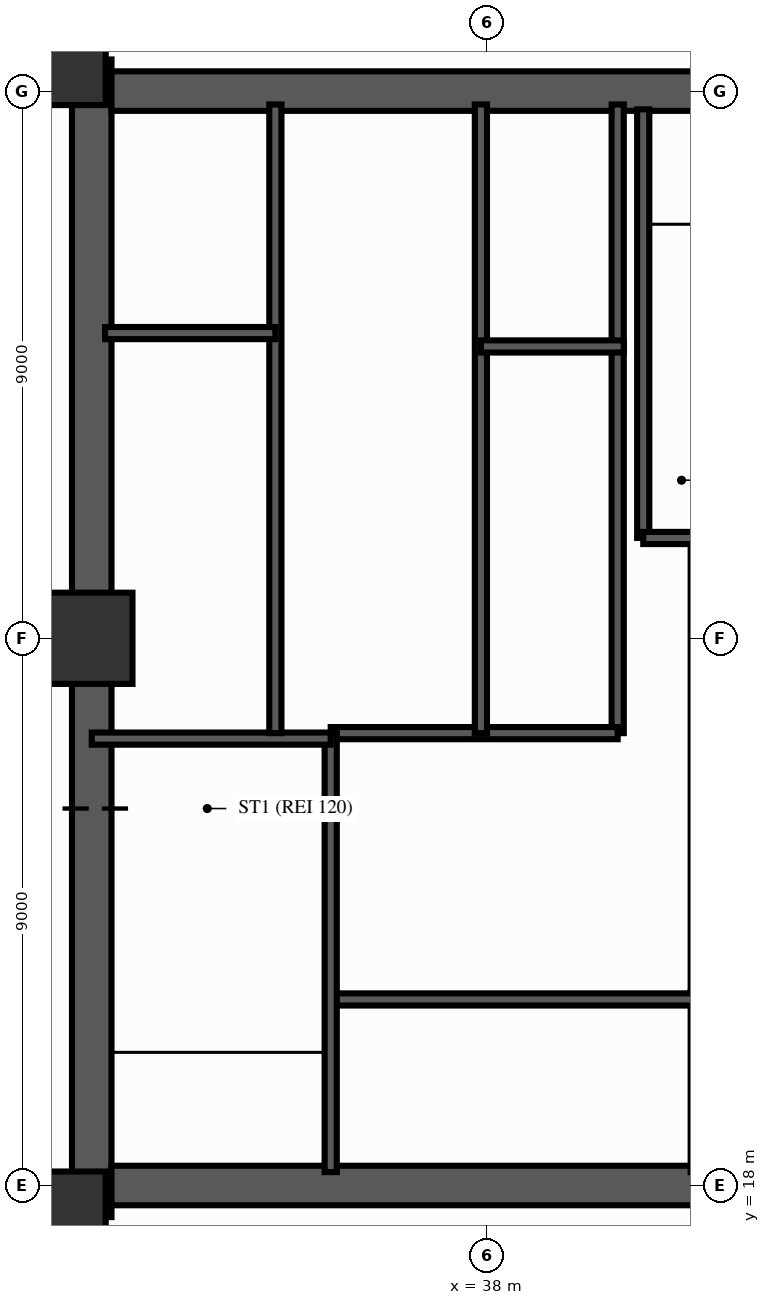
"""IFC4 building model, lengths in metres.
Left out: names, types, materials, properties, quantities, classifications, styles, units other than length and angle.
Written with IfcOpenShell. Run it as: python <this file> out.ifc"""

import sys

from ifc_helpers import new_model, si_unit, direction, frame, frame_2d, origin, origin_2d, place, context, subcontext, project, spatial, rectangle, extrude, source, transform, mapped, element, fill, save


model = new_model("IFC4")
c1 = context("Model", 3, precision=1e-05, world=origin(), true_north=direction((0.0, 1.0)))
c2 = subcontext(c1, "Body", "Model", "MODEL_VIEW")
j1 = project(units=[si_unit("LENGTHUNIT", "METRE"), si_unit("PLANEANGLEUNIT", "RADIAN")], contexts=[c1])
p1 = place(None, origin())
s1 = spatial("IfcSite", under=j1, at=p1, CompositionType="ELEMENT")
p2 = place(p1, origin())
s2 = spatial("IfcBuilding", under=s1, at=p2, CompositionType="ELEMENT")
p3 = place(p2, frame((0.0, 0.0, -9.2)))
s3 = spatial("IfcBuildingStorey", under=s2, at=p3, CompositionType="ELEMENT", Elevation=-9.2)
p4 = place(p3, frame((31.5, 17.48, 0.0), z_axis=(0.0, 0.0, 1.0), x_axis=(0.0, 1.0, 0.0)))
e1 = element("IfcWall", 1, at=p4, inside=s3, PredefinedType="SHEAR", context=c2, shape_type="SweptSolid", body=[
    extrude(rectangle(XDim=19.04, YDim=0.65, at=frame_2d((9.52, 0.0))), origin(), (0.0, 0.0, 1.0), 4.6),
])
p5 = place(p4, frame((6.32, 0.0, 0.0)))
e2 = element("IfcOpeningElement", 2, at=p5, cuts=e1, PredefinedType="OPENING", context=c2, shape_type="SweptSolid", body=[
    extrude(rectangle(XDim=1.1, YDim=2.15, at=frame_2d((0.55, 1.075))), frame((0.0, 0.337, 0.0), z_axis=(0.0, -1.0, 0.0), x_axis=(1.0, 0.0, 0.0)), (0.0, 0.0, 1.0), 0.674),
])
p6 = place(p3, frame((31.825, 18.0, 0.0), z_axis=(0.0, 0.0, 1.0), x_axis=(1.0, 0.0, 0.0)))
e3 = element("IfcWall", 3, at=p6, inside=s3, PredefinedType="SHEAR", context=c2, shape_type="SweptSolid", body=[
    extrude(rectangle(XDim=12.35, YDim=0.65, at=frame_2d((6.175, 0.0))), origin(), (0.0, 0.0, 1.0), 4.6),
])
p7 = place(p3, frame((31.825, 36.0, 0.0), z_axis=(0.0, 0.0, 1.0), x_axis=(1.0, 0.0, 0.0)))
e4 = element("IfcWall", 4, at=p7, inside=s3, PredefinedType="SHEAR", context=c2, shape_type="SweptSolid", body=[
    extrude(rectangle(XDim=12.35, YDim=0.65, at=frame_2d((6.175, 0.0))), origin(), (0.0, 0.0, 1.0), 4.6),
])
p8 = place(p7, frame((5.125, 0.0, 0.0), z_axis=(0.0, 0.0, 1.0), x_axis=(-1.0, 0.0, 0.0)))
e5 = element("IfcOpeningElement", 5, at=p8, cuts=e4, PredefinedType="OPENING", context=c2, shape_type="SweptSolid", body=[
    extrude(rectangle(XDim=1.4, YDim=2.15, at=frame_2d((0.7, 1.075))), frame((0.0, 0.337, 0.0), z_axis=(0.0, -1.0, 0.0), x_axis=(1.0, 0.0, 0.0)), (0.0, 0.0, 1.0), 0.674),
])
m1 = source(origin(), c2, "Body", "SweptSolid", [
    extrude(rectangle(XDim=1.5, YDim=1.5, at=origin_2d()), origin(), (0.0, 0.0, 1.0), 4.6),
])
for number, where, z_axis, x_axis in (
    (6, (30.98, 17.48, 0.0), (0.0, 0.0, 1.0), (1.0, 0.0, 0.0)),
    (7, (30.98, 36.52, 0.0), (0.0, 0.0, 1.0), (1.0, 0.0, 0.0)),
    (8, (31.42, 27.0, 0.0), (0.0, 0.0, 1.0), (1.0, 0.0, 0.0)),
):
    element("IfcColumn", number, at=place(p3, frame(where, z_axis=z_axis, x_axis=x_axis)), inside=s3, PredefinedType="COLUMN", context=c2, shape_type="MappedRepresentation", body=[
        mapped(m1, transform((0.0, 0.0, 0.0), scale=1.0)),
    ])
p9 = place(p3, frame((41.45, 18.22, 0.0), z_axis=(0.0, 0.0, 1.0), x_axis=(0.0, 1.0, 0.0)))
e9 = element("IfcWall", 9, at=p9, inside=s3, PredefinedType="PARTITIONING", context=c2, shape_type="SweptSolid", body=[
    extrude(rectangle(XDim=2.96, YDim=0.2, at=frame_2d((1.48, 0.0))), origin(), (0.0, 0.0, 1.0), 4.3),
])
p10 = place(p3, frame((41.45, 21.18, 0.0), z_axis=(0.0, 0.0, 1.0), x_axis=(0.0, 1.0, 0.0)))
e10 = element("IfcWall", 10, at=p10, inside=s3, PredefinedType="PARTITIONING", context=c2, shape_type="SweptSolid", body=[
    extrude(rectangle(XDim=7.42, YDim=0.2, at=frame_2d((3.71, 0.0))), origin(), (0.0, 0.0, 1.0), 4.3),
])
p11 = place(p10, frame((2.6, 0.0, 0.0)))
e11 = element("IfcOpeningElement", 11, at=p11, cuts=e10, PredefinedType="OPENING", context=c2, shape_type="SweptSolid", body=[
    extrude(rectangle(XDim=0.9, YDim=2.1, at=frame_2d((0.45, 1.05))), frame((0.0, 0.112, 0.0), z_axis=(0.0, -1.0, 0.0), x_axis=(1.0, 0.0, 0.0)), (0.0, 0.0, 1.0), 0.224),
])
p12 = place(p3, frame((40.15, 25.44, 0.0), z_axis=(0.0, 0.0, 1.0), x_axis=(0.0, 1.0, 0.0)))
e12 = element("IfcWall", 12, at=p12, inside=s3, PredefinedType="PARTITIONING", context=c2, shape_type="SweptSolid", body=[
    extrude(rectangle(XDim=6.36, YDim=0.2, at=frame_2d((3.18, 0.0))), origin(), (0.0, 0.0, 1.0), 4.3),
])
p13 = place(p3, frame((40.15, 31.8, 0.0), z_axis=(0.0, 0.0, 1.0), x_axis=(0.0, 1.0, 0.0)))
e13 = element("IfcWall", 13, at=p13, inside=s3, PredefinedType="PARTITIONING", context=c2, shape_type="SweptSolid", body=[
    extrude(rectangle(XDim=3.98, YDim=0.2, at=frame_2d((1.99, 0.0))), origin(), (0.0, 0.0, 1.0), 4.3),
])
p14 = place(p3, frame((35.43, 21.06, 0.0), z_axis=(0.0, 0.0, 1.0), x_axis=(1.0, 0.0, 0.0)))
e14 = element("IfcWall", 14, at=p14, inside=s3, PredefinedType="PARTITIONING", context=c2, shape_type="SweptSolid", body=[
    extrude(rectangle(XDim=6.02, YDim=0.2, at=frame_2d((3.01, 0.0))), origin(), (0.0, 0.0, 1.0), 4.3),
])
p15 = place(p14, frame((1.0, 0.0, 0.0)))
e15 = element("IfcOpeningElement", 15, at=p15, cuts=e14, PredefinedType="OPENING", context=c2, shape_type="SweptSolid", body=[
    extrude(rectangle(XDim=1.1, YDim=2.15, at=frame_2d((0.55, 1.075))), frame((0.0, 0.112, 0.0), z_axis=(0.0, -1.0, 0.0), x_axis=(1.0, 0.0, 0.0)), (0.0, 0.0, 1.0), 0.224),
])
p16 = place(p14, frame((2.95, 0.0, 0.0)))
e16 = element("IfcOpeningElement", 16, at=p16, cuts=e14, PredefinedType="OPENING", context=c2, shape_type="SweptSolid", body=[
    extrude(rectangle(XDim=1.1, YDim=2.15, at=frame_2d((0.55, 1.075))), frame((0.0, 0.112, 0.0), z_axis=(0.0, -1.0, 0.0), x_axis=(1.0, 0.0, 0.0)), (0.0, 0.0, 1.0), 0.224),
])
p17 = place(p14, frame((4.58, 0.0, 0.0)))
e17 = element("IfcOpeningElement", 17, at=p17, cuts=e14, PredefinedType="OPENING", context=c2, shape_type="SweptSolid", body=[
    extrude(rectangle(XDim=1.2, YDim=2.15, at=frame_2d((0.6, 1.075))), frame((0.0, 0.112, 0.0), z_axis=(0.0, -1.0, 0.0), x_axis=(1.0, 0.0, 0.0)), (0.0, 0.0, 1.0), 0.224),
])
p18 = place(p3, frame((35.43, 25.44, 0.0), z_axis=(0.0, 0.0, 1.0), x_axis=(1.0, 0.0, 0.0)))
e18 = element("IfcWall", 18, at=p18, inside=s3, PredefinedType="PARTITIONING", context=c2, shape_type="SweptSolid", body=[
    extrude(rectangle(XDim=4.72, YDim=0.2, at=frame_2d((2.36, 0.0))), origin(), (0.0, 0.0, 1.0), 4.3),
])
p19 = place(p18, frame((1.25, 0.0, 0.0)))
e19 = element("IfcOpeningElement", 19, at=p19, cuts=e18, PredefinedType="OPENING", context=c2, shape_type="SweptSolid", body=[
    extrude(rectangle(XDim=1.1, YDim=2.15, at=frame_2d((0.55, 1.075))), frame((0.0, 0.112, 0.0), z_axis=(0.0, -1.0, 0.0), x_axis=(1.0, 0.0, 0.0)), (0.0, 0.0, 1.0), 0.224),
])
p20 = place(p3, frame((35.43, 18.22, 0.0), z_axis=(0.0, 0.0, 1.0), x_axis=(0.0, 1.0, 0.0)))
e20 = element("IfcWall", 20, at=p20, inside=s3, PredefinedType="SOLIDWALL", context=c2, shape_type="SweptSolid", body=[
    extrude(rectangle(XDim=7.22, YDim=0.2, at=frame_2d((3.61, 0.0))), origin(), (0.0, 0.0, 1.0), 4.3),
])
p21 = place(p20, frame((6.68, 0.0, 0.0), z_axis=(0.0, 0.0, 1.0), x_axis=(-1.0, 0.0, 0.0)))
e21 = element("IfcOpeningElement", 21, at=p21, cuts=e20, PredefinedType="OPENING", context=c2, shape_type="SweptSolid", body=[
    extrude(rectangle(XDim=1.1, YDim=2.15, at=frame_2d((0.55, 1.075))), frame((0.0, 0.112, 0.0), z_axis=(0.0, -1.0, 0.0), x_axis=(1.0, 0.0, 0.0)), (0.0, 0.0, 1.0), 0.224),
])
p22 = place(p3, frame((31.5, 25.35, 0.0), z_axis=(0.0, 0.0, 1.0), x_axis=(1.0, 0.0, 0.0)))
e22 = element("IfcWall", 22, at=p22, inside=s3, PredefinedType="SOLIDWALL", context=c2, shape_type="SweptSolid", body=[
    extrude(rectangle(XDim=3.93, YDim=0.2, at=frame_2d((1.965, 0.0))), origin(), (0.0, 0.0, 1.0), 4.3),
])
p23 = place(p3, frame((40.57, 28.65, 0.0), z_axis=(0.0, 0.0, 1.0), x_axis=(0.0, 1.0, 0.0)))
e23 = element("IfcWall", 23, at=p23, inside=s3, PredefinedType="SOLIDWALL", context=c2, shape_type="SweptSolid", body=[
    extrude(rectangle(XDim=7.05, YDim=0.2, at=frame_2d((3.525, 0.0))), origin(), (0.0, 0.0, 1.0), 4.3),
])
p24 = place(p3, frame((40.57, 28.65, 0.0), z_axis=(0.0, 0.0, 1.0), x_axis=(1.0, 0.0, 0.0)))
e24 = element("IfcWall", 24, at=p24, inside=s3, PredefinedType="SOLIDWALL", context=c2, shape_type="SweptSolid", body=[
    extrude(rectangle(XDim=3.93, YDim=0.2, at=frame_2d((1.965, 0.0))), origin(), (0.0, 0.0, 1.0), 4.3),
])
p25 = place(p3, frame((34.52, 25.44, 0.0), z_axis=(0.0, 0.0, 1.0), x_axis=(0.0, 1.0, 0.0)))
e25 = element("IfcWall", 25, at=p25, inside=s3, PredefinedType="PARTITIONING", context=c2, shape_type="SweptSolid", body=[
    extrude(rectangle(XDim=10.34, YDim=0.2, at=frame_2d((5.17, 0.0))), origin(), (0.0, 0.0, 1.0), 4.3),
])
p26 = place(p25, frame((0.32, 0.0, 0.0)))
e26 = element("IfcOpeningElement", 26, at=p26, cuts=e25, PredefinedType="OPENING", context=c2, shape_type="SweptSolid", body=[
    extrude(rectangle(XDim=1.0, YDim=2.15, at=frame_2d((0.5, 1.075))), frame((0.0, 0.112, 0.0), z_axis=(0.0, -1.0, 0.0), x_axis=(1.0, 0.0, 0.0)), (0.0, 0.0, 1.0), 0.224),
])
p27 = place(p25, frame((1.71, 0.0, 0.0)))
e27 = element("IfcOpeningElement", 27, at=p27, cuts=e25, PredefinedType="OPENING", context=c2, shape_type="SweptSolid", body=[
    extrude(rectangle(XDim=1.0, YDim=2.15, at=frame_2d((0.5, 1.075))), frame((0.0, 0.112, 0.0), z_axis=(0.0, -1.0, 0.0), x_axis=(1.0, 0.0, 0.0)), (0.0, 0.0, 1.0), 0.224),
])
p28 = place(p25, frame((3.535, 0.0, 0.0)))
e28 = element("IfcOpeningElement", 28, at=p28, cuts=e25, PredefinedType="OPENING", context=c2, shape_type="SweptSolid", body=[
    extrude(rectangle(XDim=1.0, YDim=2.15, at=frame_2d((0.5, 1.075))), frame((0.0, 0.112, 0.0), z_axis=(0.0, -1.0, 0.0), x_axis=(1.0, 0.0, 0.0)), (0.0, 0.0, 1.0), 0.224),
])
p29 = place(p25, frame((5.135, 0.0, 0.0)))
e29 = element("IfcOpeningElement", 29, at=p29, cuts=e25, PredefinedType="OPENING", context=c2, shape_type="SweptSolid", body=[
    extrude(rectangle(XDim=1.0, YDim=2.15, at=frame_2d((0.5, 1.075))), frame((0.0, 0.112, 0.0), z_axis=(0.0, -1.0, 0.0), x_axis=(1.0, 0.0, 0.0)), (0.0, 0.0, 1.0), 0.224),
])
p30 = place(p25, frame((7.01, 0.0, 0.0)))
e30 = element("IfcOpeningElement", 30, at=p30, cuts=e25, PredefinedType="OPENING", context=c2, shape_type="SweptSolid", body=[
    extrude(rectangle(XDim=1.0, YDim=2.15, at=frame_2d((0.5, 1.075))), frame((0.0, 0.112, 0.0), z_axis=(0.0, -1.0, 0.0), x_axis=(1.0, 0.0, 0.0)), (0.0, 0.0, 1.0), 0.224),
])
p31 = place(p25, frame((8.76, 0.0, 0.0)))
e31 = element("IfcOpeningElement", 31, at=p31, cuts=e25, PredefinedType="OPENING", context=c2, shape_type="SweptSolid", body=[
    extrude(rectangle(XDim=1.0, YDim=2.15, at=frame_2d((0.5, 1.075))), frame((0.0, 0.112, 0.0), z_axis=(0.0, -1.0, 0.0), x_axis=(1.0, 0.0, 0.0)), (0.0, 0.0, 1.0), 0.224),
])
p32 = place(p3, frame((31.72, 32.02, 0.0), z_axis=(0.0, 0.0, 1.0), x_axis=(1.0, 0.0, 0.0)))
e32 = element("IfcWall", 32, at=p32, inside=s3, PredefinedType="PARTITIONING", context=c2, shape_type="SweptSolid", body=[
    extrude(rectangle(XDim=2.8, YDim=0.2, at=frame_2d((1.4, 0.0))), origin(), (0.0, 0.0, 1.0), 4.3),
])
p33 = place(p3, frame((37.9, 25.44, 0.0), z_axis=(0.0, 0.0, 1.0), x_axis=(0.0, 1.0, 0.0)))
e33 = element("IfcWall", 33, at=p33, inside=s3, PredefinedType="PARTITIONING", context=c2, shape_type="SweptSolid", body=[
    extrude(rectangle(XDim=10.34, YDim=0.2, at=frame_2d((5.17, 0.0))), origin(), (0.0, 0.0, 1.0), 4.3),
])
p34 = place(p33, frame((0.32, 0.0, 0.0)))
e34 = element("IfcOpeningElement", 34, at=p34, cuts=e33, PredefinedType="OPENING", context=c2, shape_type="SweptSolid", body=[
    extrude(rectangle(XDim=1.0, YDim=2.15, at=frame_2d((0.5, 1.075))), frame((0.0, 0.112, 0.0), z_axis=(0.0, -1.0, 0.0), x_axis=(1.0, 0.0, 0.0)), (0.0, 0.0, 1.0), 0.224),
])
p35 = place(p33, frame((1.71, 0.0, 0.0)))
e35 = element("IfcOpeningElement", 35, at=p35, cuts=e33, PredefinedType="OPENING", context=c2, shape_type="SweptSolid", body=[
    extrude(rectangle(XDim=1.0, YDim=2.15, at=frame_2d((0.5, 1.075))), frame((0.0, 0.112, 0.0), z_axis=(0.0, -1.0, 0.0), x_axis=(1.0, 0.0, 0.0)), (0.0, 0.0, 1.0), 0.224),
])
p36 = place(p33, frame((3.51, 0.0, 0.0)))
e36 = element("IfcOpeningElement", 36, at=p36, cuts=e33, PredefinedType="OPENING", context=c2, shape_type="SweptSolid", body=[
    extrude(rectangle(XDim=1.0, YDim=2.15, at=frame_2d((0.5, 1.075))), frame((0.0, 0.112, 0.0), z_axis=(0.0, -1.0, 0.0), x_axis=(1.0, 0.0, 0.0)), (0.0, 0.0, 1.0), 0.224),
])
p37 = place(p33, frame((5.01, 0.0, 0.0)))
e37 = element("IfcOpeningElement", 37, at=p37, cuts=e33, PredefinedType="OPENING", context=c2, shape_type="SweptSolid", body=[
    extrude(rectangle(XDim=1.0, YDim=2.15, at=frame_2d((0.5, 1.075))), frame((0.0, 0.112, 0.0), z_axis=(0.0, -1.0, 0.0), x_axis=(1.0, 0.0, 0.0)), (0.0, 0.0, 1.0), 0.224),
])
p38 = place(p33, frame((6.86, 0.0, 0.0)))
e38 = element("IfcOpeningElement", 38, at=p38, cuts=e33, PredefinedType="OPENING", context=c2, shape_type="SweptSolid", body=[
    extrude(rectangle(XDim=1.0, YDim=2.15, at=frame_2d((0.5, 1.075))), frame((0.0, 0.112, 0.0), z_axis=(0.0, -1.0, 0.0), x_axis=(1.0, 0.0, 0.0)), (0.0, 0.0, 1.0), 0.224),
])
p39 = place(p33, frame((8.71, 0.0, 0.0)))
e39 = element("IfcOpeningElement", 39, at=p39, cuts=e33, PredefinedType="OPENING", context=c2, shape_type="SweptSolid", body=[
    extrude(rectangle(XDim=1.0, YDim=2.15, at=frame_2d((0.5, 1.075))), frame((0.0, 0.112, 0.0), z_axis=(0.0, -1.0, 0.0), x_axis=(1.0, 0.0, 0.0)), (0.0, 0.0, 1.0), 0.224),
])
p40 = place(p3, frame((37.9, 31.8, 0.0), z_axis=(0.0, 0.0, 1.0), x_axis=(1.0, 0.0, 0.0)))
e40 = element("IfcWall", 40, at=p40, inside=s3, PredefinedType="PARTITIONING", context=c2, shape_type="SweptSolid", body=[
    extrude(rectangle(XDim=2.35, YDim=0.2, at=frame_2d((1.175, 0.0))), origin(), (0.0, 0.0, 1.0), 4.3),
])
m2 = source(origin(), c2, "Body", "SweptSolid", [
    extrude(rectangle(XDim=1.1, YDim=2.15, at=frame_2d((0.55, 1.075))), frame((0.0, 0.025, 0.0), z_axis=(0.0, -1.0, 0.0), x_axis=(1.0, 0.0, 0.0)), (0.0, 0.0, 1.0), 0.05),
])
p41 = place(p5, origin())
e41 = element("IfcDoor", 41, at=p41, inside=s3, OperationType="SINGLE_SWING_LEFT", PredefinedType="DOOR", context=c2, shape_type="MappedRepresentation", body=[
    mapped(m2, transform((0.0, 0.0, 0.0), scale=1.0)),
])
fill(e2, e41)
m3 = source(origin(), c2, "Body", "SweptSolid", [
    extrude(rectangle(XDim=1.4, YDim=2.15, at=frame_2d((0.7, 1.075))), frame((0.0, 0.025, 0.0), z_axis=(0.0, -1.0, 0.0), x_axis=(1.0, 0.0, 0.0)), (0.0, 0.0, 1.0), 0.05),
])
p42 = place(p8, origin())
e42 = element("IfcDoor", 42, at=p42, inside=s3, OperationType="SINGLE_SWING_RIGHT", PredefinedType="DOOR", context=c2, shape_type="MappedRepresentation", body=[
    mapped(m3, transform((0.0, 0.0, 0.0), scale=1.0)),
])
fill(e5, e42)
p43 = place(p15, origin())
e43 = element("IfcDoor", 43, at=p43, inside=s3, OperationType="DOUBLE_DOOR_SLIDING", PredefinedType="DOOR", context=c2, shape_type="MappedRepresentation", body=[
    mapped(m2, transform((0.0, 0.0, 0.0), scale=1.0)),
])
fill(e15, e43)
p44 = place(p16, origin())
e44 = element("IfcDoor", 44, at=p44, inside=s3, OperationType="DOUBLE_DOOR_SLIDING", PredefinedType="DOOR", context=c2, shape_type="MappedRepresentation", body=[
    mapped(m2, transform((0.0, 0.0, 0.0), scale=1.0)),
])
fill(e16, e44)
m4 = source(origin(), c2, "Body", "SweptSolid", [
    extrude(rectangle(XDim=1.2, YDim=2.15, at=frame_2d((0.6, 1.075))), frame((0.0, 0.025, 0.0), z_axis=(0.0, -1.0, 0.0), x_axis=(1.0, 0.0, 0.0)), (0.0, 0.0, 1.0), 0.05),
])
p45 = place(p17, origin())
e45 = element("IfcDoor", 45, at=p45, inside=s3, OperationType="DOUBLE_DOOR_SLIDING", PredefinedType="DOOR", context=c2, shape_type="MappedRepresentation", body=[
    mapped(m4, transform((0.0, 0.0, 0.0), scale=1.0)),
])
fill(e17, e45)
p46 = place(p19, origin())
e46 = element("IfcDoor", 46, at=p46, inside=s3, OperationType="SINGLE_SWING_RIGHT", PredefinedType="DOOR", context=c2, shape_type="MappedRepresentation", body=[
    mapped(m2, transform((0.0, 0.0, 0.0), scale=1.0)),
])
fill(e19, e46)
p47 = place(p21, origin())
e47 = element("IfcDoor", 47, at=p47, inside=s3, OperationType="SINGLE_SWING_LEFT", PredefinedType="DOOR", context=c2, shape_type="MappedRepresentation", body=[
    mapped(m2, transform((0.0, 0.0, 0.0), scale=1.0)),
])
fill(e21, e47)
m5 = source(origin(), c2, "Body", "SweptSolid", [
    extrude(rectangle(XDim=1.0, YDim=2.15, at=frame_2d((0.5, 1.075))), frame((0.0, 0.025, 0.0), z_axis=(0.0, -1.0, 0.0), x_axis=(1.0, 0.0, 0.0)), (0.0, 0.0, 1.0), 0.05),
])
p48 = place(p26, origin())
e48 = element("IfcDoor", 48, at=p48, inside=s3, OperationType="DOUBLE_DOOR_SLIDING", PredefinedType="DOOR", context=c2, shape_type="MappedRepresentation", body=[
    mapped(m5, transform((0.0, 0.0, 0.0), scale=1.0)),
])
fill(e26, e48)
p49 = place(p27, origin())
e49 = element("IfcDoor", 49, at=p49, inside=s3, OperationType="DOUBLE_DOOR_SLIDING", PredefinedType="DOOR", context=c2, shape_type="MappedRepresentation", body=[
    mapped(m5, transform((0.0, 0.0, 0.0), scale=1.0)),
])
fill(e27, e49)
p50 = place(p28, origin())
e50 = element("IfcDoor", 50, at=p50, inside=s3, OperationType="DOUBLE_DOOR_SLIDING", PredefinedType="DOOR", context=c2, shape_type="MappedRepresentation", body=[
    mapped(m5, transform((0.0, 0.0, 0.0), scale=1.0)),
])
fill(e28, e50)
p51 = place(p29, origin())
e51 = element("IfcDoor", 51, at=p51, inside=s3, OperationType="DOUBLE_DOOR_SLIDING", PredefinedType="DOOR", context=c2, shape_type="MappedRepresentation", body=[
    mapped(m5, transform((0.0, 0.0, 0.0), scale=1.0)),
])
fill(e29, e51)
p52 = place(p30, origin())
e52 = element("IfcDoor", 52, at=p52, inside=s3, OperationType="DOUBLE_DOOR_SLIDING", PredefinedType="DOOR", context=c2, shape_type="MappedRepresentation", body=[
    mapped(m5, transform((0.0, 0.0, 0.0), scale=1.0)),
])
fill(e30, e52)
p53 = place(p31, origin())
e53 = element("IfcDoor", 53, at=p53, inside=s3, OperationType="DOUBLE_DOOR_SLIDING", PredefinedType="DOOR", context=c2, shape_type="MappedRepresentation", body=[
    mapped(m5, transform((0.0, 0.0, 0.0), scale=1.0)),
])
fill(e31, e53)
p54 = place(p34, origin())
e54 = element("IfcDoor", 54, at=p54, inside=s3, OperationType="DOUBLE_DOOR_SLIDING", PredefinedType="DOOR", context=c2, shape_type="MappedRepresentation", body=[
    mapped(m5, transform((0.0, 0.0, 0.0), scale=1.0)),
])
fill(e34, e54)
p55 = place(p35, origin())
e55 = element("IfcDoor", 55, at=p55, inside=s3, OperationType="DOUBLE_DOOR_SLIDING", PredefinedType="DOOR", context=c2, shape_type="MappedRepresentation", body=[
    mapped(m5, transform((0.0, 0.0, 0.0), scale=1.0)),
])
fill(e35, e55)
p56 = place(p36, origin())
e56 = element("IfcDoor", 56, at=p56, inside=s3, OperationType="DOUBLE_DOOR_SLIDING", PredefinedType="DOOR", context=c2, shape_type="MappedRepresentation", body=[
    mapped(m5, transform((0.0, 0.0, 0.0), scale=1.0)),
])
fill(e36, e56)
p57 = place(p37, origin())
e57 = element("IfcDoor", 57, at=p57, inside=s3, OperationType="DOUBLE_DOOR_SLIDING", PredefinedType="DOOR", context=c2, shape_type="MappedRepresentation", body=[
    mapped(m5, transform((0.0, 0.0, 0.0), scale=1.0)),
])
fill(e37, e57)
p58 = place(p38, origin())
e58 = element("IfcDoor", 58, at=p58, inside=s3, OperationType="DOUBLE_DOOR_SLIDING", PredefinedType="DOOR", context=c2, shape_type="MappedRepresentation", body=[
    mapped(m5, transform((0.0, 0.0, 0.0), scale=1.0)),
])
fill(e38, e58)
p59 = place(p39, origin())
e59 = element("IfcDoor", 59, at=p59, inside=s3, OperationType="DOUBLE_DOOR_SLIDING", PredefinedType="DOOR", context=c2, shape_type="MappedRepresentation", body=[
    mapped(m5, transform((0.0, 0.0, 0.0), scale=1.0)),
])
fill(e39, e59)
save(model, sys.argv[1])
